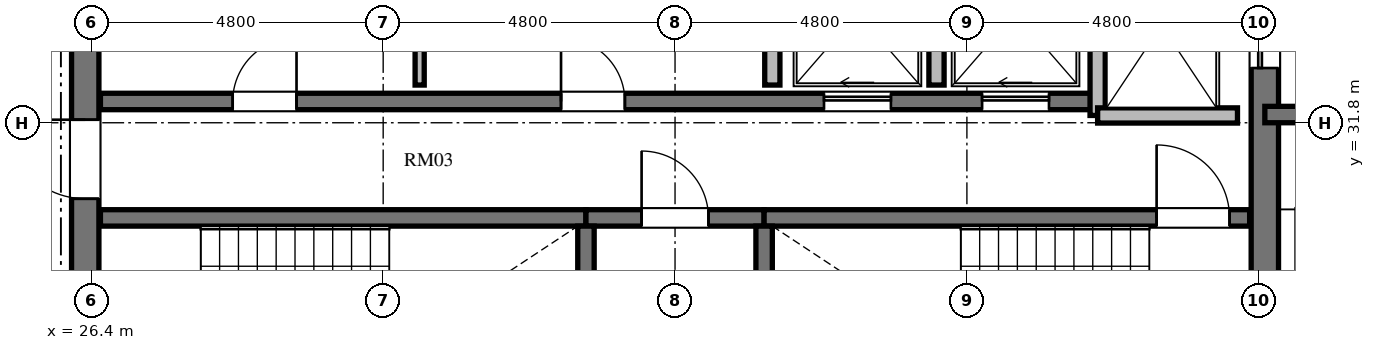
"""IFC4 building model, lengths in metres.
Left out: names, types, materials, properties, quantities, classifications, styles, units other than length and angle.
Written with IfcOpenShell. Run it as: python <this file> out.ifc"""

import sys

from ifc_helpers import new_model, si_unit, direction, frame, frame_2d, origin, place, context, subcontext, project, spatial, rectangle, extrude, element, fill, save


model = new_model("IFC4")
c1 = context("Model", 3, precision=1e-05, world=origin(), true_north=direction((0.0, 1.0)))
c2 = subcontext(c1, "Body", "Model", "MODEL_VIEW")
j1 = project(units=[si_unit("LENGTHUNIT", "METRE"), si_unit("PLANEANGLEUNIT", "RADIAN")], contexts=[c1])
p1 = place(None, origin())
s1 = spatial("IfcSite", under=j1, at=p1, CompositionType="ELEMENT")
p2 = place(p1, origin())
s2 = spatial("IfcBuilding", under=s1, at=p2, CompositionType="ELEMENT")
p3 = place(p2, frame((0.0, 0.0, 276.912)))
s3 = spatial("IfcBuildingStorey", under=s2, at=p3, CompositionType="ELEMENT", Elevation=276.912)
p4 = place(p3, frame((26.3, 20.95, 0.0), z_axis=(0.0, 0.0, 1.0), x_axis=(0.0, 1.0, 0.0)))
e1 = element("IfcWall", 1, at=p4, inside=s3, PredefinedType="SHEAR", context=c2, shape_type="SweptSolid", body=[
    extrude(rectangle(XDim=14.1, YDim=0.45, at=frame_2d((7.05, 0.0))), origin(), (0.0, 0.0, 1.0), 3.648),
])
p5 = place(p4, frame((6.5, 0.0, 0.0)))
e2 = element("IfcOpeningElement", 2, at=p5, cuts=e1, PredefinedType="OPENING", context=c2, shape_type="SweptSolid", body=[
    extrude(rectangle(XDim=1.2, YDim=2.15, at=frame_2d((0.6, 1.075))), frame((0.0, 0.235, 0.0), z_axis=(0.0, -1.0, 0.0), x_axis=(1.0, 0.0, 0.0)), (0.0, 0.0, 1.0), 0.47),
])
p6 = place(p4, frame((9.6, 0.0, 0.0)))
e3 = element("IfcOpeningElement", 3, at=p6, cuts=e1, PredefinedType="OPENING", context=c2, shape_type="SweptSolid", body=[
    extrude(rectangle(XDim=1.3, YDim=2.2, at=frame_2d((0.65, 1.1))), frame((0.0, 0.235, 0.0), z_axis=(0.0, -1.0, 0.0), x_axis=(1.0, 0.0, 0.0)), (0.0, 0.0, 1.0), 0.47),
])
p7 = place(p4, frame((3.26, 0.0, 0.0)))
e4 = element("IfcOpeningElement", 4, at=p7, cuts=e1, PredefinedType="OPENING", context=c2, shape_type="SweptSolid", body=[
    extrude(rectangle(XDim=1.3, YDim=2.2, at=frame_2d((0.65, 1.1))), frame((0.0, 0.235, 0.0), z_axis=(0.0, -1.0, 0.0), x_axis=(1.0, 0.0, 0.0)), (0.0, 0.0, 1.0), 0.47),
])
p8 = place(p3, frame((45.7, 20.95, 0.0), z_axis=(0.0, 0.0, 1.0), x_axis=(0.0, 1.0, 0.0)))
e5 = element("IfcWall", 5, at=p8, inside=s3, PredefinedType="SHEAR", context=c2, shape_type="SweptSolid", body=[
    extrude(rectangle(XDim=14.1, YDim=0.45, at=frame_2d((7.05, 0.0))), origin(), (0.0, 0.0, 1.0), 3.648),
])
p9 = place(p8, frame((11.75, 0.0, 0.0)))
e6 = element("IfcOpeningElement", 6, at=p9, cuts=e5, PredefinedType="OPENING", context=c2, shape_type="SweptSolid", body=[
    extrude(rectangle(XDim=1.4, YDim=2.3, at=frame_2d((0.7, 1.15))), frame((0.0, 0.235, 0.0), z_axis=(0.0, -1.0, 0.0), x_axis=(1.0, 0.0, 0.0)), (0.0, 0.0, 1.0), 0.47),
])
p10 = place(p8, frame((0.95, 0.0, 0.0)))
e7 = element("IfcOpeningElement", 7, at=p10, cuts=e5, PredefinedType="OPENING", context=c2, shape_type="SweptSolid", body=[
    extrude(rectangle(XDim=1.4, YDim=2.3, at=frame_2d((0.7, 1.15))), frame((0.0, 0.235, 0.0), z_axis=(0.0, -1.0, 0.0), x_axis=(1.0, 0.0, 0.0)), (0.0, 0.0, 1.0), 0.47),
])
p11 = place(p3, frame((26.55, 30.235, 0.0), z_axis=(0.0, 0.0, 1.0), x_axis=(1.0, 0.0, 0.0)))
e8 = element("IfcWall", 8, at=p11, inside=s3, PredefinedType="SHEAR", context=c2, shape_type="SweptSolid", body=[
    extrude(rectangle(XDim=7.985, YDim=0.27, at=frame_2d((3.992, 0.0))), origin(), (0.0, 0.0, 1.0), 3.648),
])
p12 = place(p3, frame((34.535, 30.235, 0.0), z_axis=(0.0, 0.0, 1.0), x_axis=(1.0, 0.0, 0.0)))
e9 = element("IfcWall", 9, at=p12, inside=s3, PredefinedType="SHEAR", context=c2, shape_type="SweptSolid", body=[
    extrude(rectangle(XDim=2.93, YDim=0.27, at=frame_2d((1.465, 0.0))), origin(), (0.0, 0.0, 1.0), 3.648),
])
p13 = place(p12, frame((0.915, 0.0, 0.0)))
e10 = element("IfcOpeningElement", 10, at=p13, cuts=e9, PredefinedType="OPENING", context=c2, shape_type="SweptSolid", body=[
    extrude(rectangle(XDim=1.1, YDim=2.15, at=frame_2d((0.55, 1.075))), frame((0.0, 0.145, 0.0), z_axis=(0.0, -1.0, 0.0), x_axis=(1.0, 0.0, 0.0)), (0.0, 0.0, 1.0), 0.29),
])
p14 = place(p3, frame((37.465, 30.235, 0.0), z_axis=(0.0, 0.0, 1.0), x_axis=(1.0, 0.0, 0.0)))
e11 = element("IfcWall", 11, at=p14, inside=s3, PredefinedType="SHEAR", context=c2, shape_type="SweptSolid", body=[
    extrude(rectangle(XDim=7.985, YDim=0.27, at=frame_2d((3.992, 0.0))), origin(), (0.0, 0.0, 1.0), 3.648),
])
p15 = place(p14, frame((6.455, 0.0, 0.0)))
e12 = element("IfcOpeningElement", 12, at=p15, cuts=e11, PredefinedType="OPENING", context=c2, shape_type="SweptSolid", body=[
    extrude(rectangle(XDim=1.2, YDim=2.15, at=frame_2d((0.6, 1.075))), frame((0.0, 0.145, 0.0), z_axis=(0.0, -1.0, 0.0), x_axis=(1.0, 0.0, 0.0)), (0.0, 0.0, 1.0), 0.29),
])
for number, where, z_axis, x_axis in (
    (13, (34.535, 26.02, 0.0), (0.0, 0.0, 1.0), (0.0, 1.0, 0.0)),
    (14, (37.465, 26.02, 0.0), (0.0, 0.0, 1.0), (0.0, 1.0, 0.0)),
):
    element("IfcWall", number, at=place(p3, frame(where, z_axis=z_axis, x_axis=x_axis)), inside=s3, PredefinedType="SHEAR", context=c2, shape_type="SweptSolid", body=[
        extrude(rectangle(XDim=4.08, YDim=0.27, at=frame_2d((2.04, 0.0))), origin(), (0.0, 0.0, 1.0), 3.648),
    ])
p16 = place(p3, frame((26.55, 32.15, 0.0), z_axis=(0.0, 0.0, 1.0), x_axis=(1.0, 0.0, 0.0)))
e15 = element("IfcWall", 15, at=p16, inside=s3, PredefinedType="SHEAR", context=c2, shape_type="SweptSolid", body=[
    extrude(rectangle(XDim=16.4, YDim=0.27, at=frame_2d((8.2, 0.0))), origin(), (0.0, 0.0, 1.0), 3.648),
])
p17 = place(p16, frame((2.175, 0.0, 0.0)))
e16 = element("IfcOpeningElement", 16, at=p17, cuts=e15, PredefinedType="OPENING", context=c2, shape_type="SweptSolid", body=[
    extrude(rectangle(XDim=1.05, YDim=2.15, at=frame_2d((0.525, 1.075))), frame((0.0, 0.145, 0.0), z_axis=(0.0, -1.0, 0.0), x_axis=(1.0, 0.0, 0.0)), (0.0, 0.0, 1.0), 0.29),
])
p18 = place(p16, frame((7.575, 0.0, 0.0)))
e17 = element("IfcOpeningElement", 17, at=p18, cuts=e15, PredefinedType="OPENING", context=c2, shape_type="SweptSolid", body=[
    extrude(rectangle(XDim=1.05, YDim=2.15, at=frame_2d((0.525, 1.075))), frame((0.0, 0.145, 0.0), z_axis=(0.0, -1.0, 0.0), x_axis=(1.0, 0.0, 0.0)), (0.0, 0.0, 1.0), 0.29),
])
p19 = place(p16, frame((11.9, 0.0, 0.0)))
e18 = element("IfcOpeningElement", 18, at=p19, cuts=e15, PredefinedType="OPENING", context=c2, shape_type="SweptSolid", body=[
    extrude(rectangle(XDim=1.1, YDim=2.2, at=frame_2d((0.55, 1.1))), frame((0.0, 0.145, 0.0), z_axis=(0.0, -1.0, 0.0), x_axis=(1.0, 0.0, 0.0)), (0.0, 0.0, 1.0), 0.29),
])
p20 = place(p16, frame((14.5, 0.0, 0.0)))
e19 = element("IfcOpeningElement", 19, at=p20, cuts=e15, PredefinedType="OPENING", context=c2, shape_type="SweptSolid", body=[
    extrude(rectangle(XDim=1.1, YDim=2.2, at=frame_2d((0.55, 1.1))), frame((0.0, 0.145, 0.0), z_axis=(0.0, -1.0, 0.0), x_axis=(1.0, 0.0, 0.0)), (0.0, 0.0, 1.0), 0.29),
])
p21 = place(p3, frame((42.95, 31.92, 0.0), z_axis=(0.0, 0.0, 1.0), x_axis=(0.0, 1.0, 0.0)))
e20 = element("IfcWall", 20, at=p21, inside=s3, PredefinedType="SOLIDWALL", context=c2, shape_type="SweptSolid", body=[
    extrude(rectangle(XDim=3.18, YDim=0.25, at=frame_2d((1.59, 0.0))), origin(), (0.0, 0.0, 1.0), 3.448),
])
p22 = place(p3, frame((42.95, 31.92, 0.0), z_axis=(0.0, 0.0, 1.0), x_axis=(1.0, 0.0, 0.0)))
e21 = element("IfcWall", 21, at=p22, inside=s3, PredefinedType="SOLIDWALL", context=c2, shape_type="SweptSolid", body=[
    extrude(rectangle(XDim=2.3, YDim=0.25, at=frame_2d((1.15, 0.0))), origin(), (0.0, 0.0, 1.0), 3.448),
])
for number, where, z_axis, x_axis in (
    (22, (37.6, 32.42, 0.0), (0.0, 0.0, 1.0), (0.0, 1.0, 0.0)),
    (23, (40.3, 32.42, 0.0), (0.0, 0.0, 1.0), (0.0, 1.0, 0.0)),
):
    element("IfcWall", number, at=place(p3, frame(where, z_axis=z_axis, x_axis=x_axis)), inside=s3, PredefinedType="SOLIDWALL", context=c2, shape_type="SweptSolid", body=[
        extrude(rectangle(XDim=2.68, YDim=0.25, at=frame_2d((1.34, 0.0))), origin(), (0.0, 0.0, 1.0), 3.448),
    ])
p23 = place(p3, frame((31.8, 32.42, 0.0), z_axis=(0.0, 0.0, 1.0), x_axis=(0.0, 1.0, 0.0)))
e24 = element("IfcWall", 24, at=p23, inside=s3, PredefinedType="PARTITIONING", context=c2, shape_type="SweptSolid", body=[
    extrude(rectangle(XDim=2.68, YDim=0.15, at=frame_2d((1.34, 0.0))), origin(), (0.0, 0.0, 1.0), 3.448),
])
p24 = place(p3, frame((45.7, 31.935, 0.0), z_axis=(0.0, 0.0, 1.0), x_axis=(1.0, 0.0, 0.0)))
e25 = element("IfcWall", 25, at=p24, inside=s3, PredefinedType="SHEAR", context=c2, shape_type="SweptSolid", body=[
    extrude(rectangle(XDim=4.715, YDim=0.27, at=frame_2d((2.357, 0.0))), origin(), (0.0, 0.0, 1.0), 3.648),
])
p25 = place(p15, origin())
e26 = element("IfcDoor", 26, at=p25, inside=s3, OperationType="SINGLE_SWING_LEFT", PredefinedType="DOOR", context=c2, shape_type="SweptSolid", body=[
    extrude(rectangle(XDim=1.2, YDim=2.15, at=frame_2d((0.6, 1.075))), frame((0.0, 0.025, 0.0), z_axis=(0.0, -1.0, 0.0), x_axis=(1.0, 0.0, 0.0)), (0.0, 0.0, 1.0), 0.05),
])
fill(e12, e26)
p26 = place(p13, origin())
e27 = element("IfcDoor", 27, at=p26, inside=s3, OperationType="SINGLE_SWING_LEFT", PredefinedType="DOOR", context=c2, shape_type="SweptSolid", body=[
    extrude(rectangle(XDim=1.1, YDim=2.15, at=frame_2d((0.55, 1.075))), frame((0.0, 0.025, 0.0), z_axis=(0.0, -1.0, 0.0), x_axis=(1.0, 0.0, 0.0)), (0.0, 0.0, 1.0), 0.05),
])
fill(e10, e27)
p27 = place(p6, origin())
e28 = element("IfcDoor", 28, at=p27, inside=s3, OperationType="SINGLE_SWING_RIGHT", PredefinedType="DOOR", context=c2, shape_type="SweptSolid", body=[
    extrude(rectangle(XDim=1.3, YDim=2.2, at=frame_2d((0.65, 1.1))), frame((0.0, 0.025, 0.0), z_axis=(0.0, -1.0, 0.0), x_axis=(1.0, 0.0, 0.0)), (0.0, 0.0, 1.0), 0.05),
])
fill(e3, e28)
p28 = place(p17, origin())
e29 = element("IfcDoor", 29, at=p28, inside=s3, OperationType="SINGLE_SWING_RIGHT", PredefinedType="DOOR", context=c2, shape_type="SweptSolid", body=[
    extrude(rectangle(XDim=1.05, YDim=2.15, at=frame_2d((0.525, 1.075))), frame((0.0, 0.025, 0.0), z_axis=(0.0, -1.0, 0.0), x_axis=(1.0, 0.0, 0.0)), (0.0, 0.0, 1.0), 0.05),
])
fill(e16, e29)
p29 = place(p18, origin())
e30 = element("IfcDoor", 30, at=p29, inside=s3, OperationType="SINGLE_SWING_LEFT", PredefinedType="DOOR", context=c2, shape_type="SweptSolid", body=[
    extrude(rectangle(XDim=1.05, YDim=2.15, at=frame_2d((0.525, 1.075))), frame((0.0, 0.025, 0.0), z_axis=(0.0, -1.0, 0.0), x_axis=(1.0, 0.0, 0.0)), (0.0, 0.0, 1.0), 0.05),
])
fill(e17, e30)
p30 = place(p19, origin())
e31 = element("IfcDoor", 31, at=p30, inside=s3, OperationType="SLIDING_TO_LEFT", PredefinedType="DOOR", context=c2, shape_type="SweptSolid", body=[
    extrude(rectangle(XDim=1.1, YDim=2.2, at=frame_2d((0.55, 1.1))), frame((0.0, 0.025, 0.0), z_axis=(0.0, -1.0, 0.0), x_axis=(1.0, 0.0, 0.0)), (0.0, 0.0, 1.0), 0.05),
])
fill(e18, e31)
p31 = place(p20, origin())
e32 = element("IfcDoor", 32, at=p31, inside=s3, OperationType="SLIDING_TO_LEFT", PredefinedType="DOOR", context=c2, shape_type="SweptSolid", body=[
    extrude(rectangle(XDim=1.1, YDim=2.2, at=frame_2d((0.55, 1.1))), frame((0.0, 0.025, 0.0), z_axis=(0.0, -1.0, 0.0), x_axis=(1.0, 0.0, 0.0)), (0.0, 0.0, 1.0), 0.05),
])
fill(e19, e32)
p32 = place(p9, origin())
e33 = element("IfcDoor", 33, at=p32, inside=s3, OperationType="SLIDING_TO_LEFT", PredefinedType="DOOR", context=c2, shape_type="SweptSolid", body=[
    extrude(rectangle(XDim=1.4, YDim=2.3, at=frame_2d((0.7, 1.15))), frame((0.0, 0.025, 0.0), z_axis=(0.0, -1.0, 0.0), x_axis=(1.0, 0.0, 0.0)), (0.0, 0.0, 1.0), 0.05),
])
fill(e6, e33)
save(model, sys.argv[1])
